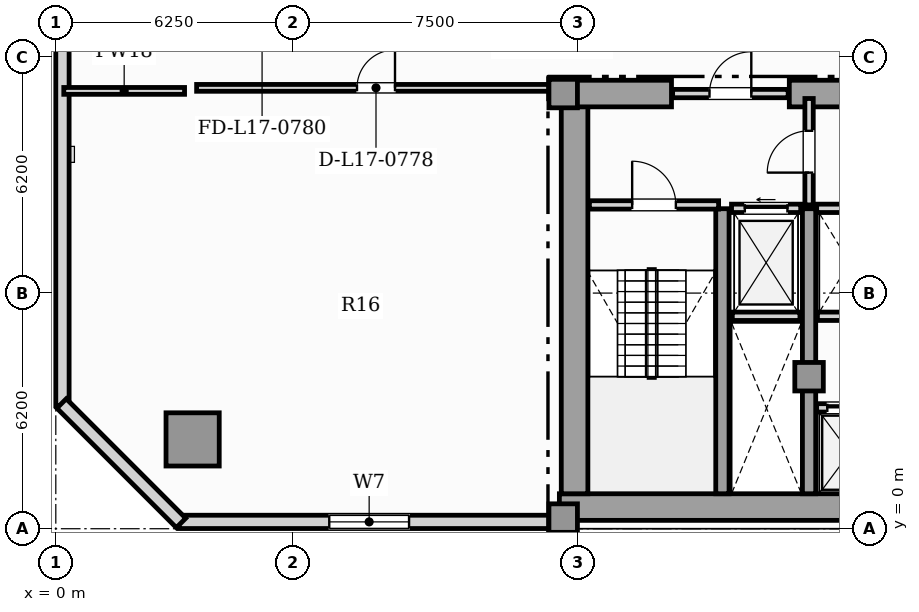
"""IFC4 building model, lengths in metres.
Left out: names, types, materials, properties, quantities, classifications, styles, units other than length and angle.
Written with IfcOpenShell. Run it as: python <this file> out.ifc"""

import sys

from ifc_helpers import new_model, si_unit, direction, frame, frame_2d, origin, origin_2d, place, context, subcontext, project, spatial, rectangle, hollow_rectangle, extrude, element, fill, save


model = new_model("IFC4")
c1 = context("Model", 3, precision=1e-05, world=origin(), true_north=direction((0.0, 1.0)))
c2 = subcontext(c1, "Body", "Model", "MODEL_VIEW")
j1 = project(units=[si_unit("LENGTHUNIT", "METRE"), si_unit("PLANEANGLEUNIT", "RADIAN")], contexts=[c1])
p1 = place(None, origin())
s1 = spatial("IfcSite", under=j1, at=p1, CompositionType="ELEMENT")
p2 = place(p1, origin())
s2 = spatial("IfcBuilding", under=s1, at=p2, CompositionType="ELEMENT")
p3 = place(p2, frame((0.0, 0.0, 72.15)))
s3 = spatial("IfcBuildingStorey", under=s2, at=p3, CompositionType="ELEMENT", Elevation=72.15)
p4 = place(p3, frame((13.25, 0.57, 0.0), z_axis=(0.0, 0.0, 1.0), x_axis=(1.0, 0.0, 0.0)))
e1 = element("IfcWall", 1, at=p4, inside=s3, PredefinedType="SHEAR", context=c2, shape_type="SweptSolid", body=[
    extrude(rectangle(XDim=31.0, YDim=0.7, at=frame_2d((15.5, 0.0))), origin(), (0.0, 0.0, 1.0), 3.57),
])
p5 = place(p3, frame((13.65, 0.92, 0.0), z_axis=(0.0, 0.0, 1.0), x_axis=(0.0, 1.0, 0.0)))
e2 = element("IfcWall", 2, at=p5, inside=s3, PredefinedType="SHEAR", context=c2, shape_type="SweptSolid", body=[
    extrude(rectangle(XDim=10.53, YDim=0.7, at=frame_2d((5.265, 0.0))), origin(), (0.0, 0.0, 1.0), 3.57),
])
p6 = place(p3, frame((13.25, 11.45, 0.0), z_axis=(0.0, 0.0, 1.0), x_axis=(1.0, 0.0, 0.0)))
e3 = element("IfcWall", 3, at=p6, inside=s3, PredefinedType="SHEAR", context=c2, shape_type="SweptSolid", body=[
    extrude(rectangle(XDim=2.95, YDim=0.7, at=frame_2d((1.475, 0.0))), origin(), (0.0, 0.0, 1.0), 3.57),
])
p7 = place(p3, frame((19.3, 11.45, 0.0), z_axis=(0.0, 0.0, 1.0), x_axis=(1.0, 0.0, 0.0)))
e4 = element("IfcWall", 4, at=p7, inside=s3, PredefinedType="SHEAR", context=c2, shape_type="SweptSolid", body=[
    extrude(rectangle(XDim=7.3, YDim=0.7, at=frame_2d((3.65, 0.0))), origin(), (0.0, 0.0, 1.0), 3.57),
])
for number, where, z_axis, x_axis in (
    (5, (17.54, 0.92, 0.0), (0.0, 0.0, 1.0), (0.0, 1.0, 0.0)),
    (6, (19.82, 0.92, 0.0), (0.0, 0.0, 1.0), (0.0, 1.0, 0.0)),
):
    element("IfcWall", number, at=place(p3, frame(where, z_axis=z_axis, x_axis=x_axis)), inside=s3, PredefinedType="SHEAR", context=c2, shape_type="SweptSolid", body=[
        extrude(rectangle(XDim=7.5, YDim=0.35, at=frame_2d((3.75, 0.0))), origin(), (0.0, 0.0, 1.0), 3.57),
    ])
for number, where, z_axis, x_axis in (
    (7, (13.35, 0.28, 0.0), (0.0, 0.0, 1.0), (1.0, 0.0, 0.0)),
    (8, (13.35, 11.45, 0.0), (0.0, 0.0, 1.0), (1.0, 0.0, 0.0)),
    (9, (19.82, 4.0, 0.0), (0.0, 0.0, 1.0), (1.0, 0.0, 0.0)),
):
    element("IfcColumn", number, at=place(p3, frame(where, z_axis=z_axis, x_axis=x_axis)), inside=s3, PredefinedType="COLUMN", context=c2, shape_type="SweptSolid", body=[
        extrude(rectangle(XDim=0.75, YDim=0.75, at=origin_2d()), origin(), (0.0, 0.0, 1.0), 3.85),
    ])
p8 = place(p3, frame((3.6, 2.35, 0.0), z_axis=(0.0, 0.0, 1.0), x_axis=(1.0, 0.0, 0.0)))
e10 = element("IfcColumn", 10, at=p8, inside=s3, PredefinedType="USERDEFINED", context=c2, shape_type="SweptSolid", body=[
    extrude(hollow_rectangle(XDim=1.4, YDim=1.4, WallThickness=0.08, at=origin_2d()), origin(), (0.0, 0.0, 1.0), 3.85),
])
p9 = place(p3, frame((3.24, 0.18, 0.0), z_axis=(0.0, 0.0, 1.0), x_axis=(1.0, 0.0, 0.0)))
e11 = element("IfcWall", 11, at=p9, inside=s3, PredefinedType="SOLIDWALL", context=c2, shape_type="SweptSolid", body=[
    extrude(rectangle(XDim=10.01, YDim=0.35, at=frame_2d((5.005, 0.0))), origin(), (0.0, 0.0, 1.0), 3.57),
])
p10 = place(p9, frame((3.955, 0.0, 0.85)))
e12 = element("IfcOpeningElement", 12, at=p10, cuts=e11, PredefinedType="OPENING", context=c2, shape_type="SweptSolid", body=[
    extrude(rectangle(XDim=2.1, YDim=2.05, at=frame_2d((1.05, 1.025))), frame((0.0, 0.185, 0.0), z_axis=(0.0, -1.0, 0.0), x_axis=(1.0, 0.0, 0.0)), (0.0, 0.0, 1.0), 0.37),
])
p11 = place(p3, frame((0.175, 43.16, 0.0), z_axis=(0.0, 0.0, 1.0), x_axis=(0.0, -1.0, 0.0)))
e13 = element("IfcWall", 13, at=p11, inside=s3, PredefinedType="SOLIDWALL", context=c2, shape_type="SweptSolid", body=[
    extrude(rectangle(XDim=39.92, YDim=0.35, at=frame_2d((19.96, 0.0))), origin(), (0.0, 0.0, 1.0), 3.57),
])
p12 = place(p11, frame((3.34, 0.0, 0.95)))
e14 = element("IfcOpeningElement", 14, at=p12, cuts=e13, PredefinedType="OPENING", context=c2, shape_type="SweptSolid", body=[
    extrude(rectangle(XDim=0.9, YDim=1.5, at=frame_2d((0.45, 0.75))), frame((0.0, 0.185, 0.0), z_axis=(0.0, -1.0, 0.0), x_axis=(1.0, 0.0, 0.0)), (0.0, 0.0, 1.0), 0.37),
])
p13 = place(p11, frame((14.698, 0.0, 0.9)))
e15 = element("IfcOpeningElement", 15, at=p13, cuts=e13, PredefinedType="OPENING", context=c2, shape_type="SweptSolid", body=[
    extrude(rectangle(XDim=1.5, YDim=1.95, at=frame_2d((0.75, 0.975))), frame((0.0, 0.185, 0.0), z_axis=(0.0, -1.0, 0.0), x_axis=(1.0, 0.0, 0.0)), (0.0, 0.0, 1.0), 0.37),
])
p14 = place(p3, frame((0.152, 3.295, 0.0), z_axis=(0.0, 0.0, 1.0), x_axis=(0.707106781187, -0.707106781187, 0.0)))
e16 = element("IfcWall", 16, at=p14, inside=s3, PredefinedType="SOLIDWALL", context=c2, shape_type="SweptSolid", body=[
    extrude(rectangle(XDim=4.445, YDim=0.35, at=frame_2d((2.223, 0.0))), origin(), (0.0, 0.0, 1.0), 3.57),
])
p15 = place(p3, frame((17.8, 5.59, 0.0), z_axis=(0.0, 0.0, 1.0), x_axis=(1.0, 0.0, 0.0)))
e17 = element("IfcWall", 17, at=p15, inside=s3, PredefinedType="SOLIDWALL", context=c2, shape_type="SweptSolid", body=[
    extrude(rectangle(XDim=1.78, YDim=0.22, at=frame_2d((0.89, 0.0))), origin(), (0.0, 0.0, 1.0), 3.57),
])
p16 = place(p3, frame((17.78, 8.43, 0.0), z_axis=(0.0, 0.0, 1.0), x_axis=(1.0, 0.0, 0.0)))
e18 = element("IfcWall", 18, at=p16, inside=s3, PredefinedType="SOLIDWALL", context=c2, shape_type="SweptSolid", body=[
    extrude(rectangle(XDim=1.82, YDim=0.22, at=frame_2d((0.91, 0.0))), origin(), (0.0, 0.0, 1.0), 3.57),
])
p17 = place(p16, frame((0.35, 0.0, 0.0)))
e19 = element("IfcOpeningElement", 19, at=p17, cuts=e18, PredefinedType="OPENING", context=c2, shape_type="SweptSolid", body=[
    extrude(rectangle(XDim=1.12, YDim=2.25, at=frame_2d((0.56, 1.125))), frame((0.0, 0.12, 0.0), z_axis=(0.0, -1.0, 0.0), x_axis=(1.0, 0.0, 0.0)), (0.0, 0.0, 1.0), 0.24),
])
p18 = place(p3, frame((20.02, 3.18, 0.0), z_axis=(0.0, 0.0, 1.0), x_axis=(1.0, 0.0, 0.0)))
e20 = element("IfcWall", 20, at=p18, inside=s3, PredefinedType="SOLIDWALL", context=c2, shape_type="SweptSolid", body=[
    extrude(rectangle(XDim=1.74, YDim=0.22, at=frame_2d((0.87, 0.0))), origin(), (0.0, 0.0, 1.0), 3.57),
])
p19 = place(p18, frame((0.28, 0.0, 0.0)))
e21 = element("IfcOpeningElement", 21, at=p19, cuts=e20, PredefinedType="OPENING", context=c2, shape_type="SweptSolid", body=[
    extrude(rectangle(XDim=1.18, YDim=2.2, at=frame_2d((0.59, 1.1))), frame((0.0, 0.12, 0.0), z_axis=(0.0, -1.0, 0.0), x_axis=(1.0, 0.0, 0.0)), (0.0, 0.0, 1.0), 0.24),
])
p20 = place(p3, frame((20.04, 5.59, 0.0), z_axis=(0.0, 0.0, 1.0), x_axis=(1.0, 0.0, 0.0)))
e22 = element("IfcWall", 22, at=p20, inside=s3, PredefinedType="SOLIDWALL", context=c2, shape_type="SweptSolid", body=[
    extrude(rectangle(XDim=1.7, YDim=0.22, at=frame_2d((0.85, 0.0))), origin(), (0.0, 0.0, 1.0), 3.57),
])
p21 = place(p3, frame((20.02, 8.43, 0.0), z_axis=(0.0, 0.0, 1.0), x_axis=(1.0, 0.0, 0.0)))
e23 = element("IfcWall", 23, at=p21, inside=s3, PredefinedType="SOLIDWALL", context=c2, shape_type="SweptSolid", body=[
    extrude(rectangle(XDim=1.74, YDim=0.22, at=frame_2d((0.87, 0.0))), origin(), (0.0, 0.0, 1.0), 3.57),
])
p22 = place(p3, frame((14.04, 8.52, 0.0), z_axis=(0.0, 0.0, 1.0), x_axis=(1.0, 0.0, 0.0)))
e24 = element("IfcWall", 24, at=p22, inside=s3, PredefinedType="SOLIDWALL", context=c2, shape_type="SweptSolid", body=[
    extrude(rectangle(XDim=3.4, YDim=0.22, at=frame_2d((1.7, 0.0))), origin(), (0.0, 0.0, 1.0), 3.57),
])
p23 = place(p22, frame((1.125, 0.0, 0.0)))
e25 = element("IfcOpeningElement", 25, at=p23, cuts=e24, PredefinedType="OPENING", context=c2, shape_type="SweptSolid", body=[
    extrude(rectangle(XDim=1.15, YDim=2.2, at=frame_2d((0.575, 1.1))), frame((0.0, 0.12, 0.0), z_axis=(0.0, -1.0, 0.0), x_axis=(1.0, 0.0, 0.0)), (0.0, 0.0, 1.0), 0.24),
])
p24 = place(p3, frame((19.82, 8.52, 0.0), z_axis=(0.0, 0.0, 1.0), x_axis=(0.0, 1.0, 0.0)))
e26 = element("IfcWall", 26, at=p24, inside=s3, PredefinedType="SOLIDWALL", context=c2, shape_type="SweptSolid", body=[
    extrude(rectangle(XDim=2.8, YDim=0.22, at=frame_2d((1.4, 0.0))), origin(), (0.0, 0.0, 1.0), 3.026),
])
p25 = place(p24, frame((0.85, 0.0, 0.0)))
e27 = element("IfcOpeningElement", 27, at=p25, cuts=e26, PredefinedType="OPENING", context=c2, shape_type="SweptSolid", body=[
    extrude(rectangle(XDim=1.1, YDim=2.2, at=frame_2d((0.55, 1.1))), frame((0.0, 0.12, 0.0), z_axis=(0.0, -1.0, 0.0), x_axis=(1.0, 0.0, 0.0)), (0.0, 0.0, 1.0), 0.24),
])
p26 = place(p3, frame((16.23, 11.45, 0.0), z_axis=(0.0, 0.0, 1.0), x_axis=(1.0, 0.0, 0.0)))
e28 = element("IfcWall", 28, at=p26, inside=s3, PredefinedType="SOLIDWALL", context=c2, shape_type="SweptSolid", body=[
    extrude(rectangle(XDim=3.04, YDim=0.22, at=frame_2d((1.52, 0.0))), origin(), (0.0, 0.0, 1.0), 3.57),
])
p27 = place(p26, frame((0.97, 0.0, 0.0)))
e29 = element("IfcOpeningElement", 29, at=p27, cuts=e28, PredefinedType="OPENING", context=c2, shape_type="SweptSolid", body=[
    extrude(rectangle(XDim=1.1, YDim=2.2, at=frame_2d((0.55, 1.1))), frame((0.0, 0.12, 0.0), z_axis=(0.0, -1.0, 0.0), x_axis=(1.0, 0.0, 0.0)), (0.0, 0.0, 1.0), 0.24),
])
p28 = place(p3, frame((3.705, 11.6, 0.0), z_axis=(0.0, 0.0, 1.0), x_axis=(1.0, 0.0, 0.0)))
e30 = element("IfcWall", 30, at=p28, inside=s3, PredefinedType="PARTITIONING", context=c2, shape_type="SweptSolid", body=[
    extrude(rectangle(XDim=9.44, YDim=0.18, at=frame_2d((4.72, 0.0))), origin(), (0.0, 0.0, 1.0), 3.57),
])
p29 = place(p28, frame((4.22, 0.0, 0.0)))
e31 = element("IfcOpeningElement", 31, at=p29, cuts=e30, PredefinedType="OPENING", context=c2, shape_type="SweptSolid", body=[
    extrude(rectangle(XDim=1.0, YDim=2.15, at=frame_2d((0.5, 1.075))), frame((0.0, 0.1, 0.0), z_axis=(0.0, -1.0, 0.0), x_axis=(1.0, 0.0, 0.0)), (0.0, 0.0, 1.0), 0.2),
])
p30 = place(p3, frame((0.21, 11.52, 0.0), z_axis=(0.0, 0.0, 1.0), x_axis=(1.0, 0.0, 0.0)))
e32 = element("IfcWall", 32, at=p30, inside=s3, PredefinedType="PARTITIONING", context=c2, shape_type="SweptSolid", body=[
    extrude(rectangle(XDim=3.178, YDim=0.18, at=frame_2d((1.589, 0.0))), origin(), (0.0, 0.0, 1.0), 3.57),
])
p31 = place(p10, origin())
e33 = element("IfcWindow", 33, at=p31, inside=s3, PartitioningType="SINGLE_PANEL", PredefinedType="WINDOW", context=c2, shape_type="SweptSolid", body=[
    extrude(rectangle(XDim=2.1, YDim=2.05, at=frame_2d((1.05, 1.025))), frame((0.0, 0.03, 0.0), z_axis=(0.0, -1.0, 0.0), x_axis=(1.0, 0.0, 0.0)), (0.0, 0.0, 1.0), 0.06),
])
fill(e12, e33)
p32 = place(p17, origin())
e34 = element("IfcDoor", 34, at=p32, inside=s3, OperationType="SLIDING_TO_LEFT", PredefinedType="DOOR", context=c2, shape_type="SweptSolid", body=[
    extrude(rectangle(XDim=1.12, YDim=2.25, at=frame_2d((0.56, 1.125))), frame((0.0, 0.025, 0.0), z_axis=(0.0, -1.0, 0.0), x_axis=(1.0, 0.0, 0.0)), (0.0, 0.0, 1.0), 0.05),
])
fill(e19, e34)
p33 = place(p19, origin())
e35 = element("IfcDoor", 35, at=p33, inside=s3, OperationType="SLIDING_TO_RIGHT", PredefinedType="DOOR", context=c2, shape_type="SweptSolid", body=[
    extrude(rectangle(XDim=1.18, YDim=2.2, at=frame_2d((0.59, 1.1))), frame((0.0, 0.025, 0.0), z_axis=(0.0, -1.0, 0.0), x_axis=(1.0, 0.0, 0.0)), (0.0, 0.0, 1.0), 0.05),
])
fill(e21, e35)
p34 = place(p23, origin())
e36 = element("IfcDoor", 36, at=p34, inside=s3, OperationType="SINGLE_SWING_LEFT", PredefinedType="DOOR", context=c2, shape_type="SweptSolid", body=[
    extrude(rectangle(XDim=1.15, YDim=2.2, at=frame_2d((0.575, 1.1))), frame((0.0, 0.025, 0.0), z_axis=(0.0, -1.0, 0.0), x_axis=(1.0, 0.0, 0.0)), (0.0, 0.0, 1.0), 0.05),
])
fill(e25, e36)
p35 = place(p25, origin())
e37 = element("IfcDoor", 37, at=p35, inside=s3, OperationType="SINGLE_SWING_LEFT", PredefinedType="DOOR", context=c2, shape_type="SweptSolid", body=[
    extrude(rectangle(XDim=1.1, YDim=2.2, at=frame_2d((0.55, 1.1))), frame((0.0, 0.025, 0.0), z_axis=(0.0, -1.0, 0.0), x_axis=(1.0, 0.0, 0.0)), (0.0, 0.0, 1.0), 0.05),
])
fill(e27, e37)
p36 = place(p27, origin())
e38 = element("IfcDoor", 38, at=p36, inside=s3, OperationType="SINGLE_SWING_RIGHT", PredefinedType="DOOR", context=c2, shape_type="SweptSolid", body=[
    extrude(rectangle(XDim=1.1, YDim=2.2, at=frame_2d((0.55, 1.1))), frame((0.0, 0.025, 0.0), z_axis=(0.0, -1.0, 0.0), x_axis=(1.0, 0.0, 0.0)), (0.0, 0.0, 1.0), 0.05),
])
fill(e29, e38)
p37 = place(p29, origin())
e39 = element("IfcDoor", 39, at=p37, inside=s3, OperationType="SINGLE_SWING_RIGHT", PredefinedType="DOOR", context=c2, shape_type="SweptSolid", body=[
    extrude(rectangle(XDim=1.0, YDim=2.15, at=frame_2d((0.5, 1.075))), frame((0.0, 0.025, 0.0), z_axis=(0.0, -1.0, 0.0), x_axis=(1.0, 0.0, 0.0)), (0.0, 0.0, 1.0), 0.05),
])
fill(e31, e39)
save(model, sys.argv[1])
